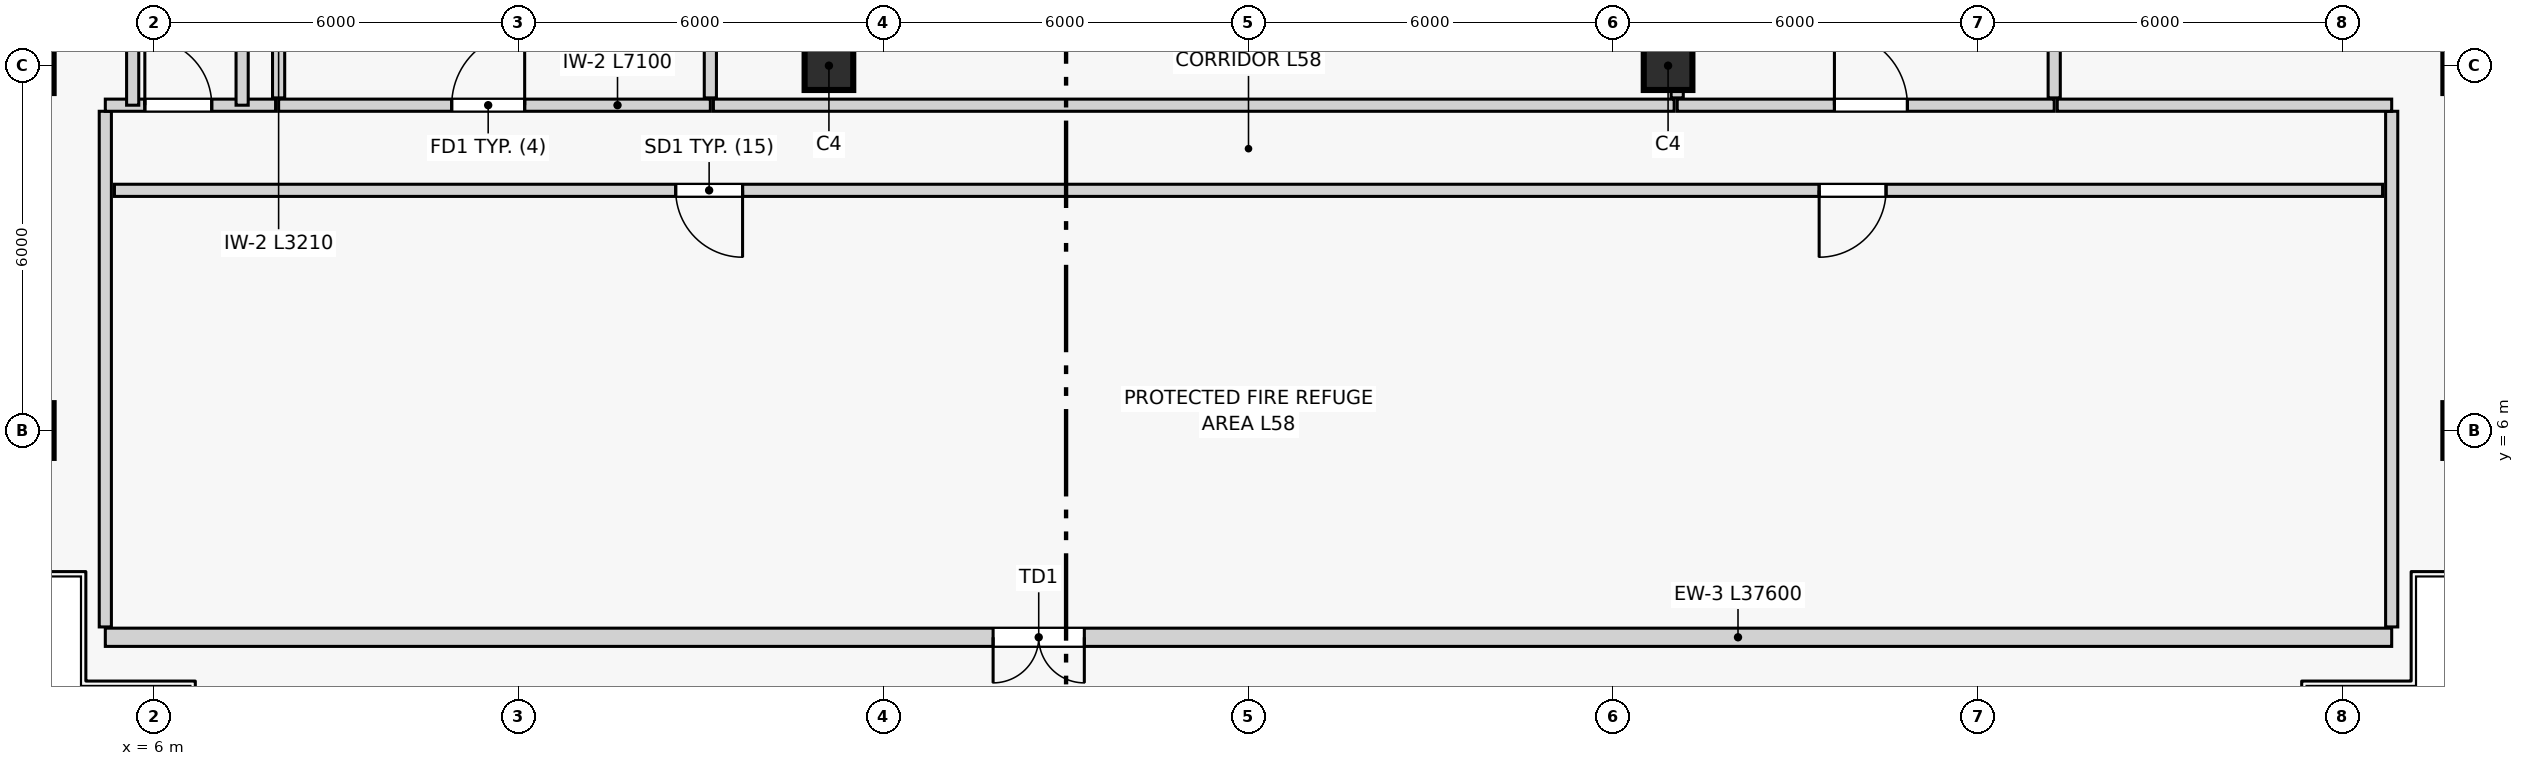
"""IFC4 building model, lengths in metres.
Left out: names, types, materials, properties, quantities, classifications, styles, units other than length and angle.
Written with IfcOpenShell. Run it as: python <this file> out.ifc"""

import sys

from ifc_helpers import new_model, si_unit, direction, frame, frame_2d, origin, origin_2d, place, context, subcontext, project, spatial, rectangle, extrude, source, transform, mapped, element, fill, save


model = new_model("IFC4")
c1 = context("Model", 3, precision=1e-05, world=origin(), true_north=direction((0.0, 1.0)))
c2 = subcontext(c1, "Body", "Model", "MODEL_VIEW")
j1 = project(units=[si_unit("LENGTHUNIT", "METRE"), si_unit("PLANEANGLEUNIT", "RADIAN")], contexts=[c1])
p1 = place(None, origin())
s1 = spatial("IfcSite", under=j1, at=p1, CompositionType="ELEMENT")
p2 = place(p1, origin())
s2 = spatial("IfcBuilding", under=s1, at=p2, CompositionType="ELEMENT")
p3 = place(p2, frame((0.0, 0.0, 220.5)))
s3 = spatial("IfcBuildingStorey", under=s2, at=p3, CompositionType="ELEMENT", Elevation=220.5)
m1 = source(origin(), c2, "Body", "SweptSolid", [
    extrude(rectangle(XDim=0.9, YDim=0.9, at=origin_2d()), origin(), (0.0, 0.0, 1.0), 7.2),
])
for number, where, z_axis, x_axis in (
    (1, (3.9, 6.0, 0.0), (0.0, 0.0, 1.0), (1.0, 0.0, 0.0)),
    (2, (44.1, 6.0, 0.0), (0.0, 0.0, 1.0), (1.0, 0.0, 0.0)),
    (3, (3.9, 12.0, 0.0), (0.0, 0.0, 1.0), (1.0, 0.0, 0.0)),
    (4, (44.1, 12.0, 0.0), (0.0, 0.0, 1.0), (1.0, 0.0, 0.0)),
):
    element("IfcColumn", number, at=place(p3, frame(where, z_axis=z_axis, x_axis=x_axis)), inside=s3, PredefinedType="COLUMN", context=c2, shape_type="MappedRepresentation", body=[
        mapped(m1, transform((0.0, 0.0, 0.0), scale=1.0)),
    ])
m2 = source(origin(), c2, "Body", "SweptSolid", [
    extrude(rectangle(XDim=0.8, YDim=0.8, at=origin_2d()), origin(), (0.0, 0.0, 1.0), 7.2),
])
for number, where, z_axis, x_axis in (
    (5, (17.1, 12.0, 0.0), (0.0, 0.0, 1.0), (1.0, 0.0, 0.0)),
    (6, (30.9, 12.0, 0.0), (0.0, 0.0, 1.0), (1.0, 0.0, 0.0)),
):
    element("IfcColumn", number, at=place(p3, frame(where, z_axis=z_axis, x_axis=x_axis)), inside=s3, PredefinedType="COLUMN", context=c2, shape_type="MappedRepresentation", body=[
        mapped(m2, transform((0.0, 0.0, 0.0), scale=1.0)),
    ])
p4 = place(p3, frame((5.2, 2.6, 0.0), z_axis=(0.0, 0.0, 1.0), x_axis=(1.0, 0.0, 0.0)))
e7 = element("IfcWall", 7, at=p4, inside=s3, PredefinedType="SOLIDWALL", context=c2, shape_type="SweptSolid", body=[
    extrude(rectangle(XDim=37.6, YDim=0.3, at=frame_2d((18.8, 0.0))), origin(), (0.0, 0.0, 1.0), 6.55),
])
p5 = place(p4, frame((14.6, 0.0, 0.0)))
e8 = element("IfcOpeningElement", 8, at=p5, cuts=e7, PredefinedType="OPENING", context=c2, shape_type="SweptSolid", body=[
    extrude(rectangle(XDim=1.5, YDim=2.3, at=frame_2d((0.75, 1.15))), frame((0.0, 0.16, 0.0), z_axis=(0.0, -1.0, 0.0), x_axis=(1.0, 0.0, 0.0)), (0.0, 0.0, 1.0), 0.32),
])
p6 = place(p3, frame((8.05, 11.35, 0.0), z_axis=(0.0, 0.0, 1.0), x_axis=(1.0, 0.0, 0.0)))
e9 = element("IfcWall", 9, at=p6, inside=s3, PredefinedType="PARTITIONING", context=c2, shape_type="SweptSolid", body=[
    extrude(rectangle(XDim=7.1, YDim=0.2, at=frame_2d((3.55, 0.0))), origin(), (0.0, 0.0, 1.0), 4.95),
])
p7 = place(p6, frame((2.846, 0.0, 0.0)))
e10 = element("IfcOpeningElement", 10, at=p7, cuts=e9, PredefinedType="OPENING", context=c2, shape_type="SweptSolid", body=[
    extrude(rectangle(XDim=1.2, YDim=2.2, at=frame_2d((0.6, 1.1))), frame((0.0, 0.11, 0.0), z_axis=(0.0, -1.0, 0.0), x_axis=(1.0, 0.0, 0.0)), (0.0, 0.0, 1.0), 0.22),
])
for number, where, z_axis, x_axis in (
    (11, (8.05, 11.47, 0.0), (0.0, 0.0, 1.0), (0.0, 1.0, 0.0)),
    (12, (15.15, 11.47, 0.0), (0.0, 0.0, 1.0), (0.0, 1.0, 0.0)),
):
    element("IfcWall", number, at=place(p3, frame(where, z_axis=z_axis, x_axis=x_axis)), inside=s3, PredefinedType="PARTITIONING", context=c2, shape_type="SweptSolid", body=[
        extrude(rectangle(XDim=3.21, YDim=0.2, at=frame_2d((1.605, 0.0))), origin(), (0.0, 0.0, 1.0), 6.55),
    ])
p8 = place(p3, frame((31.05, 11.35, 0.0), z_axis=(0.0, 0.0, 1.0), x_axis=(1.0, 0.0, 0.0)))
e13 = element("IfcWall", 13, at=p8, inside=s3, PredefinedType="PARTITIONING", context=c2, shape_type="SweptSolid", body=[
    extrude(rectangle(XDim=6.2, YDim=0.2, at=frame_2d((3.1, 0.0))), origin(), (0.0, 0.0, 1.0), 4.95),
])
p9 = place(p8, frame((2.586, 0.0, 0.0)))
e14 = element("IfcOpeningElement", 14, at=p9, cuts=e13, PredefinedType="OPENING", context=c2, shape_type="SweptSolid", body=[
    extrude(rectangle(XDim=1.2, YDim=2.2, at=frame_2d((0.6, 1.1))), frame((0.0, 0.11, 0.0), z_axis=(0.0, -1.0, 0.0), x_axis=(1.0, 0.0, 0.0)), (0.0, 0.0, 1.0), 0.22),
])
p10 = place(p3, frame((31.05, 11.47, 0.0), z_axis=(0.0, 0.0, 1.0), x_axis=(0.0, 1.0, 0.0)))
e15 = element("IfcWall", 15, at=p10, inside=s3, PredefinedType="PARTITIONING", context=c2, shape_type="SweptSolid", body=[
    extrude(rectangle(XDim=3.21, YDim=0.2, at=frame_2d((1.605, 0.0))), origin(), (0.0, 0.0, 1.0), 4.95),
])
p11 = place(p3, frame((37.25, 11.47, 0.0), z_axis=(0.0, 0.0, 1.0), x_axis=(0.0, 1.0, 0.0)))
e16 = element("IfcWall", 16, at=p11, inside=s3, PredefinedType="PARTITIONING", context=c2, shape_type="SweptSolid", body=[
    extrude(rectangle(XDim=3.21, YDim=0.2, at=frame_2d((1.605, 0.0))), origin(), (0.0, 0.0, 1.0), 6.55),
])
for number, where, z_axis, x_axis in (
    (17, (5.2, 2.77, 0.0), (0.0, 0.0, 1.0), (0.0, 1.0, 0.0)),
    (18, (42.8, 2.77, 0.0), (0.0, 0.0, 1.0), (0.0, 1.0, 0.0)),
):
    element("IfcWall", number, at=place(p3, frame(where, z_axis=z_axis, x_axis=x_axis)), inside=s3, PredefinedType="PARTITIONING", context=c2, shape_type="SweptSolid", body=[
        extrude(rectangle(XDim=8.48, YDim=0.2, at=frame_2d((4.24, 0.0))), origin(), (0.0, 0.0, 1.0), 6.55),
    ])
p12 = place(p3, frame((5.2, 11.35, 0.0), z_axis=(0.0, 0.0, 1.0), x_axis=(1.0, 0.0, 0.0)))
e19 = element("IfcWall", 19, at=p12, inside=s3, PredefinedType="PARTITIONING", context=c2, shape_type="SweptSolid", body=[
    extrude(rectangle(XDim=2.8, YDim=0.2, at=frame_2d((1.4, 0.0))), origin(), (0.0, 0.0, 1.0), 4.95),
])
p13 = place(p12, frame((0.65, 0.0, 0.0)))
e20 = element("IfcOpeningElement", 20, at=p13, cuts=e19, PredefinedType="OPENING", context=c2, shape_type="SweptSolid", body=[
    extrude(rectangle(XDim=1.1, YDim=2.2, at=frame_2d((0.55, 1.1))), frame((0.0, 0.11, 0.0), z_axis=(0.0, -1.0, 0.0), x_axis=(1.0, 0.0, 0.0)), (0.0, 0.0, 1.0), 0.22),
])
p14 = place(p3, frame((15.2, 11.35, 0.0), z_axis=(0.0, 0.0, 1.0), x_axis=(1.0, 0.0, 0.0)))
e21 = element("IfcWall", 21, at=p14, inside=s3, PredefinedType="PARTITIONING", context=c2, shape_type="SweptSolid", body=[
    extrude(rectangle(XDim=15.8, YDim=0.2, at=frame_2d((7.9, 0.0))), origin(), (0.0, 0.0, 1.0), 4.95),
])
p15 = place(p3, frame((37.3, 11.35, 0.0), z_axis=(0.0, 0.0, 1.0), x_axis=(1.0, 0.0, 0.0)))
e22 = element("IfcWall", 22, at=p15, inside=s3, PredefinedType="PARTITIONING", context=c2, shape_type="SweptSolid", body=[
    extrude(rectangle(XDim=5.5, YDim=0.2, at=frame_2d((2.75, 0.0))), origin(), (0.0, 0.0, 1.0), 4.95),
])
p16 = place(p3, frame((5.35, 9.95, 0.0), z_axis=(0.0, 0.0, 1.0), x_axis=(1.0, 0.0, 0.0)))
e23 = element("IfcWall", 23, at=p16, inside=s3, PredefinedType="PARTITIONING", context=c2, shape_type="SweptSolid", body=[
    extrude(rectangle(XDim=37.3, YDim=0.2, at=frame_2d((18.65, 0.0))), origin(), (0.0, 0.0, 1.0), 6.55),
])
p17 = place(p16, frame((9.23, 0.0, 0.0)))
e24 = element("IfcOpeningElement", 24, at=p17, cuts=e23, PredefinedType="OPENING", context=c2, shape_type="SweptSolid", body=[
    extrude(rectangle(XDim=1.1, YDim=2.2, at=frame_2d((0.55, 1.1))), frame((0.0, 0.11, 0.0), z_axis=(0.0, -1.0, 0.0), x_axis=(1.0, 0.0, 0.0)), (0.0, 0.0, 1.0), 0.22),
])
p18 = place(p16, frame((28.034, 0.0, 0.0)))
e25 = element("IfcOpeningElement", 25, at=p18, cuts=e23, PredefinedType="OPENING", context=c2, shape_type="SweptSolid", body=[
    extrude(rectangle(XDim=1.1, YDim=2.2, at=frame_2d((0.55, 1.1))), frame((0.0, 0.11, 0.0), z_axis=(0.0, -1.0, 0.0), x_axis=(1.0, 0.0, 0.0)), (0.0, 0.0, 1.0), 0.22),
])
p19 = place(p3, frame((5.65, 11.35, 0.0), z_axis=(0.0, 0.0, 1.0), x_axis=(0.0, 1.0, 0.0)))
e26 = element("IfcWall", 26, at=p19, inside=s3, PredefinedType="PARTITIONING", context=c2, shape_type="SweptSolid", body=[
    extrude(rectangle(XDim=6.23, YDim=0.2, at=frame_2d((3.115, 0.0))), origin(), (0.0, 0.0, 1.0), 6.55),
])
p20 = place(p3, frame((7.45, 11.35, 0.0), z_axis=(0.0, 0.0, 1.0), x_axis=(0.0, 1.0, 0.0)))
e27 = element("IfcWall", 27, at=p20, inside=s3, PredefinedType="PARTITIONING", context=c2, shape_type="SweptSolid", body=[
    extrude(rectangle(XDim=3.85, YDim=0.2, at=frame_2d((1.925, 0.0))), origin(), (0.0, 0.0, 1.0), 6.55),
])
m3 = source(origin(), c2, "Body", "SweptSolid", [
    extrude(rectangle(XDim=1.5, YDim=2.3, at=frame_2d((0.75, 1.15))), frame((0.0, 0.025, 0.0), z_axis=(0.0, -1.0, 0.0), x_axis=(1.0, 0.0, 0.0)), (0.0, 0.0, 1.0), 0.05),
])
p21 = place(p5, frame((1.5, 0.0, 0.0), z_axis=(0.0, 0.0, 1.0), x_axis=(-1.0, 0.0, 0.0)))
e28 = element("IfcDoor", 28, at=p21, inside=s3, OperationType="DOUBLE_DOOR_SINGLE_SWING", PredefinedType="DOOR", context=c2, shape_type="MappedRepresentation", body=[
    mapped(m3, transform((0.0, 0.0, 0.0), scale=1.0)),
])
fill(e8, e28)
m4 = source(origin(), c2, "Body", "SweptSolid", [
    extrude(rectangle(XDim=1.2, YDim=2.2, at=frame_2d((0.6, 1.1))), frame((0.0, 0.025, 0.0), z_axis=(0.0, -1.0, 0.0), x_axis=(1.0, 0.0, 0.0)), (0.0, 0.0, 1.0), 0.05),
])
p22 = place(p7, origin())
e29 = element("IfcDoor", 29, at=p22, inside=s3, OperationType="SINGLE_SWING_RIGHT", PredefinedType="DOOR", context=c2, shape_type="MappedRepresentation", body=[
    mapped(m4, transform((0.0, 0.0, 0.0), scale=1.0)),
])
fill(e10, e29)
p23 = place(p9, origin())
e30 = element("IfcDoor", 30, at=p23, inside=s3, OperationType="SINGLE_SWING_LEFT", PredefinedType="DOOR", context=c2, shape_type="MappedRepresentation", body=[
    mapped(m4, transform((0.0, 0.0, 0.0), scale=1.0)),
])
fill(e14, e30)
m5 = source(origin(), c2, "Body", "SweptSolid", [
    extrude(rectangle(XDim=1.1, YDim=2.2, at=frame_2d((0.55, 1.1))), frame((0.0, 0.025, 0.0), z_axis=(0.0, -1.0, 0.0), x_axis=(1.0, 0.0, 0.0)), (0.0, 0.0, 1.0), 0.05),
])
p24 = place(p17, frame((1.1, 0.0, 0.0), z_axis=(0.0, 0.0, 1.0), x_axis=(-1.0, 0.0, 0.0)))
e31 = element("IfcDoor", 31, at=p24, inside=s3, OperationType="SINGLE_SWING_LEFT", PredefinedType="DOOR", context=c2, shape_type="MappedRepresentation", body=[
    mapped(m5, transform((0.0, 0.0, 0.0), scale=1.0)),
])
fill(e24, e31)
p25 = place(p18, frame((1.1, 0.0, 0.0), z_axis=(0.0, 0.0, 1.0), x_axis=(-1.0, 0.0, 0.0)))
e32 = element("IfcDoor", 32, at=p25, inside=s3, OperationType="SINGLE_SWING_RIGHT", PredefinedType="DOOR", context=c2, shape_type="MappedRepresentation", body=[
    mapped(m5, transform((0.0, 0.0, 0.0), scale=1.0)),
])
fill(e25, e32)
p26 = place(p13, origin())
e33 = element("IfcDoor", 33, at=p26, inside=s3, OperationType="SINGLE_SWING_LEFT", PredefinedType="DOOR", context=c2, shape_type="MappedRepresentation", body=[
    mapped(m5, transform((0.0, 0.0, 0.0), scale=1.0)),
])
fill(e20, e33)
save(model, sys.argv[1])
